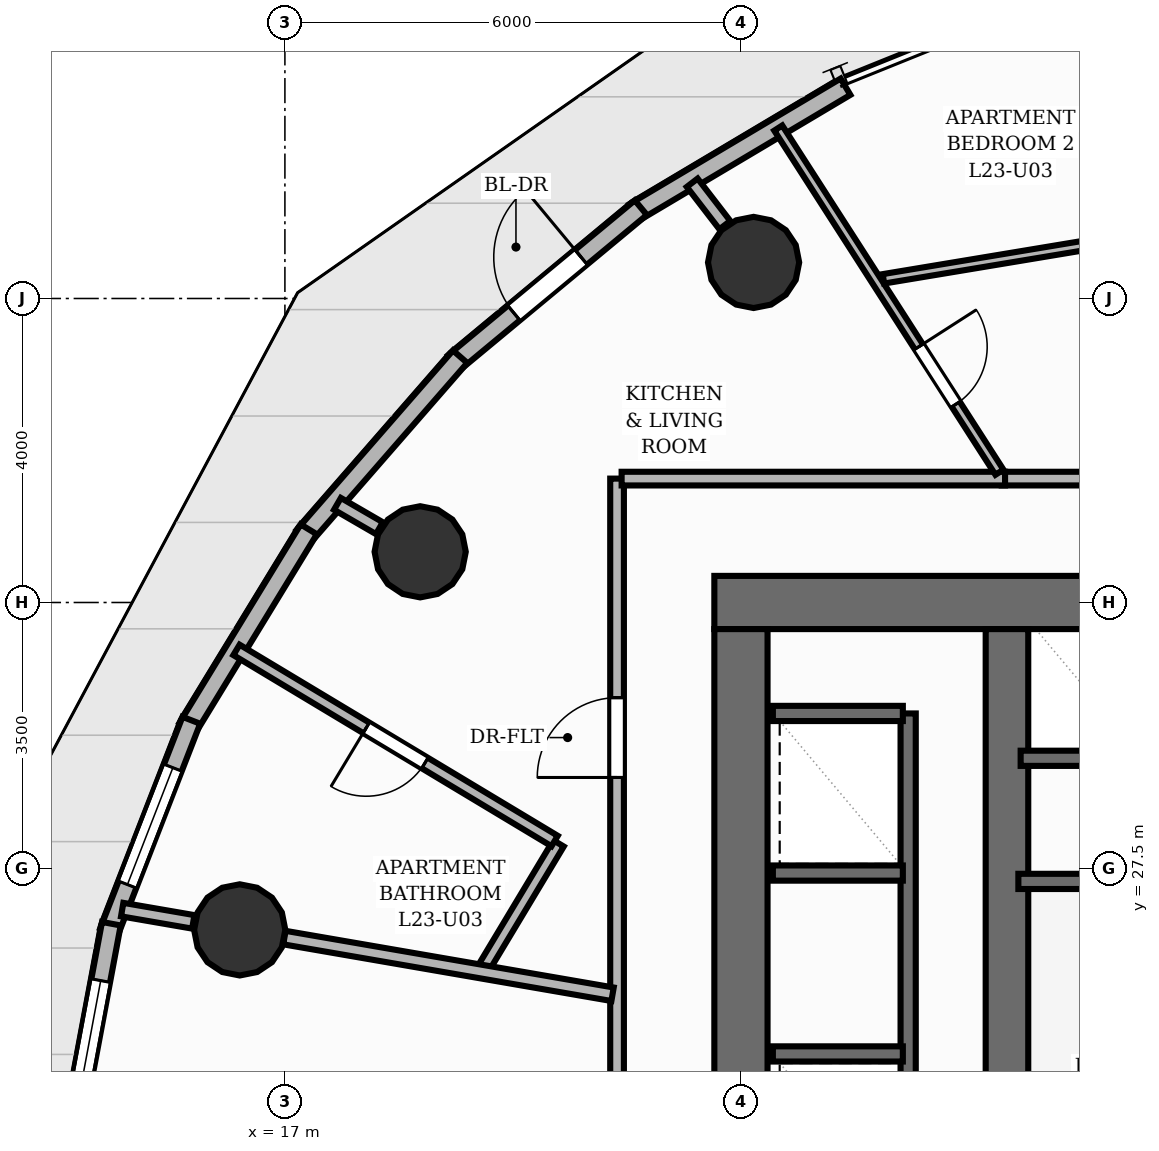
"""IFC4 building model, lengths in metres.
Left out: names, types, materials, properties, quantities, classifications, styles, units other than length and angle.
Written with IfcOpenShell. Run it as: python <this file> out.ifc"""

import sys

from ifc_helpers import new_model, si_unit, direction, frame, frame_2d, origin, origin_2d, place, context, subcontext, project, spatial, rectangle, circle, extrude, element, fill, save


model = new_model("IFC4")
c1 = context("Model", 3, precision=1e-05, world=origin(), true_north=direction((0.0, 1.0)))
c2 = subcontext(c1, "Body", "Model", "MODEL_VIEW")
j1 = project(units=[si_unit("LENGTHUNIT", "METRE"), si_unit("PLANEANGLEUNIT", "RADIAN")], contexts=[c1])
p1 = place(None, origin())
s1 = spatial("IfcSite", under=j1, at=p1, CompositionType="ELEMENT")
p2 = place(p1, origin())
s2 = spatial("IfcBuilding", under=s1, at=p2, CompositionType="ELEMENT")
p3 = place(p2, frame((0.0, 0.0, 80.48)))
s3 = spatial("IfcBuildingStorey", under=s2, at=p3, CompositionType="ELEMENT", Elevation=80.48)
p4 = place(p3, frame((22.65, 31.0, 0.0), z_axis=(0.0, 0.0, 1.0), x_axis=(1.0, 0.0, 0.0)))
e1 = element("IfcWall", 1, at=p4, inside=s3, PredefinedType="SHEAR", context=c2, shape_type="SweptSolid", body=[
    extrude(rectangle(XDim=18.7, YDim=0.7, at=frame_2d((9.35, 0.0))), origin(), (0.0, 0.0, 1.0), 3.2),
])
p5 = place(p4, frame((11.75, 0.0, 0.0)))
e2 = element("IfcOpeningElement", 2, at=p5, cuts=e1, PredefinedType="OPENING", context=c2, shape_type="SweptSolid", body=[
    extrude(rectangle(XDim=1.1, YDim=2.15, at=frame_2d((0.55, 1.075))), frame((0.0, 0.36, 0.0), z_axis=(0.0, -1.0, 0.0), x_axis=(1.0, 0.0, 0.0)), (0.0, 0.0, 1.0), 0.72),
])
p6 = place(p3, frame((23.0, 17.35, 0.0), z_axis=(0.0, 0.0, 1.0), x_axis=(0.0, 1.0, 0.0)))
e3 = element("IfcWall", 3, at=p6, inside=s3, PredefinedType="SHEAR", context=c2, shape_type="SweptSolid", body=[
    extrude(rectangle(XDim=13.3, YDim=0.7, at=frame_2d((6.65, 0.0))), origin(), (0.0, 0.0, 1.0), 3.2),
])
p7 = place(p3, frame((26.5, 17.35, 0.0), z_axis=(0.0, 0.0, 1.0), x_axis=(0.0, 1.0, 0.0)))
e4 = element("IfcWall", 4, at=p7, inside=s3, PredefinedType="SHEAR", context=c2, shape_type="SweptSolid", body=[
    extrude(rectangle(XDim=13.3, YDim=0.56, at=frame_2d((6.65, 0.0))), origin(), (0.0, 0.0, 1.0), 3.2),
])
for number, where, z_axis, x_axis in (
    (5, (23.167, 35.474, 0.0), (0.0, 0.0, 1.0), (1.0, 0.0, 0.0)),
    (6, (18.78, 31.667, 0.0), (0.0, 0.0, 1.0), (1.0, 0.0, 0.0)),
    (7, (16.406, 26.692, 0.0), (0.0, 0.0, 1.0), (1.0, 0.0, 0.0)),
):
    element("IfcColumn", number, at=place(p3, frame(where, z_axis=z_axis, x_axis=x_axis)), inside=s3, PredefinedType="COLUMN", context=c2, shape_type="SweptSolid", body=[
        extrude(circle(Radius=0.6, at=origin_2d()), origin(), (0.0, 0.0, 1.0), 3.2),
    ])
p8 = place(p3, frame((21.594, 36.132, 0.0), z_axis=(0.0, 0.0, 1.0), x_axis=(0.859543053771, 0.511063341196, 0.0)))
e8 = element("IfcWall", 8, at=p8, inside=s3, PredefinedType="SOLIDWALL", context=c2, shape_type="SweptSolid", body=[
    extrude(rectangle(XDim=3.236, YDim=0.25, at=frame_2d((1.618, 0.0))), origin(), (0.0, 0.0, 1.0), 2.96),
])
p9 = place(p3, frame((19.227, 34.157, 0.0), z_axis=(0.0, 0.0, 1.0), x_axis=(0.769611275013, 0.638512713557, 0.0)))
e9 = element("IfcWall", 9, at=p9, inside=s3, PredefinedType="SOLIDWALL", context=c2, shape_type="SweptSolid", body=[
    extrude(rectangle(XDim=3.192, YDim=0.25, at=frame_2d((1.596, 0.0))), origin(), (0.0, 0.0, 1.0), 2.96),
])
p10 = place(p9, frame((1.021, 0.0, 0.0)))
e10 = element("IfcOpeningElement", 10, at=p10, cuts=e9, PredefinedType="OPENING", context=c2, shape_type="SweptSolid", body=[
    extrude(rectangle(XDim=1.15, YDim=2.2, at=frame_2d((0.575, 1.1))), frame((0.0, 0.135, 0.0), z_axis=(0.0, -1.0, 0.0), x_axis=(1.0, 0.0, 0.0)), (0.0, 0.0, 1.0), 0.27),
])
p11 = place(p3, frame((17.248, 31.873, 0.0), z_axis=(0.0, 0.0, 1.0), x_axis=(0.656940925155, 0.753942054044, 0.0)))
e11 = element("IfcWall", 11, at=p11, inside=s3, PredefinedType="SOLIDWALL", context=c2, shape_type="SweptSolid", body=[
    extrude(rectangle(XDim=3.131, YDim=0.25, at=frame_2d((1.565, 0.0))), origin(), (0.0, 0.0, 1.0), 2.96),
])
p12 = place(p3, frame((15.719, 29.35, 0.0), z_axis=(0.0, 0.0, 1.0), x_axis=(0.520956264952, 0.853583370273, 0.0)))
e12 = element("IfcWall", 12, at=p12, inside=s3, PredefinedType="SOLIDWALL", context=c2, shape_type="SweptSolid", body=[
    extrude(rectangle(XDim=3.061, YDim=0.25, at=frame_2d((1.53, 0.0))), origin(), (0.0, 0.0, 1.0), 2.96),
])
p13 = place(p3, frame((14.686, 26.665, 0.0), z_axis=(0.0, 0.0, 1.0), x_axis=(0.362414720493, 0.93201693674, 0.0)))
e13 = element("IfcWall", 13, at=p13, inside=s3, PredefinedType="SOLIDWALL", context=c2, shape_type="SweptSolid", body=[
    extrude(rectangle(XDim=2.988, YDim=0.25, at=frame_2d((1.494, 0.0))), origin(), (0.0, 0.0, 1.0), 2.96),
])
p14 = place(p13, frame((0.669, 0.0, 0.85)))
e14 = element("IfcOpeningElement", 14, at=p14, cuts=e13, PredefinedType="OPENING", context=c2, shape_type="SweptSolid", body=[
    extrude(rectangle(XDim=1.65, YDim=1.37, at=frame_2d((0.825, 0.685))), frame((0.0, 0.135, 0.0), z_axis=(0.0, -1.0, 0.0), x_axis=(1.0, 0.0, 0.0)), (0.0, 0.0, 1.0), 0.27),
])
p15 = place(p3, frame((14.179, 23.9, 0.0), z_axis=(0.0, 0.0, 1.0), x_axis=(0.183975908968, 0.982930752861, 0.0)))
e15 = element("IfcWall", 15, at=p15, inside=s3, PredefinedType="SOLIDWALL", context=c2, shape_type="SweptSolid", body=[
    extrude(rectangle(XDim=2.923, YDim=0.25, at=frame_2d((1.462, 0.0))), origin(), (0.0, 0.0, 1.0), 2.96),
])
p16 = place(p15, frame((0.762, 0.0, 0.85)))
e16 = element("IfcOpeningElement", 16, at=p16, cuts=e15, PredefinedType="OPENING", context=c2, shape_type="SweptSolid", body=[
    extrude(rectangle(XDim=1.4, YDim=1.55, at=frame_2d((0.7, 0.775))), frame((0.0, 0.135, 0.0), z_axis=(0.0, -1.0, 0.0), x_axis=(1.0, 0.0, 0.0)), (0.0, 0.0, 1.0), 0.27),
])
p17 = place(p3, frame((26.65, 27.33, 0.0), z_axis=(0.0, 0.0, 1.0), x_axis=(1.0, 0.0, 0.0)))
e17 = element("IfcWall", 17, at=p17, inside=s3, PredefinedType="SHEAR", context=c2, shape_type="SweptSolid", body=[
    extrude(rectangle(XDim=3.24, YDim=0.2, at=frame_2d((1.62, 0.0))), origin(), (0.0, 0.0, 1.0), 3.2),
])
p18 = place(p3, frame((25.2, 18.46, 0.0), z_axis=(0.0, 0.0, 1.0), x_axis=(0.0, 1.0, 0.0)))
e18 = element("IfcWall", 18, at=p18, inside=s3, PredefinedType="SHEAR", context=c2, shape_type="SweptSolid", body=[
    extrude(rectangle(XDim=11.08, YDim=0.2, at=frame_2d((5.54, 0.0))), origin(), (0.0, 0.0, 1.0), 3.2),
])
for number, where, z_axis, x_axis in (
    (19, (23.42, 29.54, 0.0), (0.0, 0.0, 1.0), (1.0, 0.0, 0.0)),
    (20, (23.42, 25.06, 0.0), (0.0, 0.0, 1.0), (1.0, 0.0, 0.0)),
    (21, (23.42, 27.44, 0.0), (0.0, 0.0, 1.0), (1.0, 0.0, 0.0)),
):
    element("IfcWall", number, at=place(p3, frame(where, z_axis=z_axis, x_axis=x_axis)), inside=s3, PredefinedType="SHEAR", context=c2, shape_type="SweptSolid", body=[
        extrude(rectangle(XDim=1.71, YDim=0.2, at=frame_2d((0.855, 0.0))), origin(), (0.0, 0.0, 1.0), 3.2),
    ])
p19 = place(p3, frame((26.68, 28.95, 0.0), z_axis=(0.0, 0.0, 1.0), x_axis=(1.0, 0.0, 0.0)))
e22 = element("IfcWall", 22, at=p19, inside=s3, PredefinedType="SHEAR", context=c2, shape_type="SweptSolid", body=[
    extrude(rectangle(XDim=5.24, YDim=0.2, at=frame_2d((2.62, 0.0))), origin(), (0.0, 0.0, 1.0), 3.2),
])
p20 = place(p3, frame((22.788, 35.966, 0.0), z_axis=(0.0, 0.0, 1.0), x_axis=(-0.609945476355, 0.792443383387, 0.0)))
e23 = element("IfcWall", 23, at=p20, inside=s3, PredefinedType="PARTITIONING", context=c2, shape_type="SweptSolid", body=[
    extrude(rectangle(XDim=0.704, YDim=0.18, at=frame_2d((0.352, 0.0))), origin(), (0.0, 0.0, 1.0), 2.26),
])
p21 = place(p3, frame((18.243, 31.978, 0.0), z_axis=(0.0, 0.0, 1.0), x_axis=(-0.864928236137, 0.501895553212, 0.0)))
e24 = element("IfcWall", 24, at=p21, inside=s3, PredefinedType="PARTITIONING", context=c2, shape_type="SweptSolid", body=[
    extrude(rectangle(XDim=0.638, YDim=0.18, at=frame_2d((0.319, 0.0))), origin(), (0.0, 0.0, 1.0), 2.26),
])
p22 = place(p3, frame((15.794, 26.798, 0.0), z_axis=(0.0, 0.0, 1.0), x_axis=(-0.985396187556, 0.170277284302, 0.0)))
e25 = element("IfcWall", 25, at=p22, inside=s3, PredefinedType="PARTITIONING", context=c2, shape_type="SweptSolid", body=[
    extrude(rectangle(XDim=0.949, YDim=0.18, at=frame_2d((0.475, 0.0))), origin(), (0.0, 0.0, 1.0), 2.26),
])
p23 = place(p3, frame((26.431, 32.63, 0.0), z_axis=(0.0, 0.0, 1.0), x_axis=(1.0, 0.0, 0.0)))
e26 = element("IfcWall", 26, at=p23, inside=s3, PredefinedType="PARTITIONING", context=c2, shape_type="SweptSolid", body=[
    extrude(rectangle(XDim=16.199, YDim=0.18, at=frame_2d((8.099, 0.0))), origin(), (0.0, 0.0, 1.0), 2.955),
])
p24 = place(p23, frame((11.645, 0.0, 0.0)))
e27 = element("IfcOpeningElement", 27, at=p24, cuts=e26, PredefinedType="OPENING", context=c2, shape_type="SweptSolid", body=[
    extrude(rectangle(XDim=1.05, YDim=2.15, at=frame_2d((0.525, 1.075))), frame((0.0, 0.1, 0.0), z_axis=(0.0, -1.0, 0.0), x_axis=(1.0, 0.0, 0.0)), (0.0, 0.0, 1.0), 0.2),
])
p25 = place(p3, frame((21.37, 15.37, 0.0), z_axis=(0.0, 0.0, 1.0), x_axis=(0.0, 1.0, 0.0)))
e28 = element("IfcWall", 28, at=p25, inside=s3, PredefinedType="PARTITIONING", context=c2, shape_type="SweptSolid", body=[
    extrude(rectangle(XDim=17.26, YDim=0.18, at=frame_2d((8.63, 0.0))), origin(), (0.0, 0.0, 1.0), 2.955),
])
p26 = place(p25, frame((13.328, 0.0, 0.0)))
e29 = element("IfcOpeningElement", 29, at=p26, cuts=e28, PredefinedType="OPENING", context=c2, shape_type="SweptSolid", body=[
    extrude(rectangle(XDim=1.05, YDim=2.15, at=frame_2d((0.525, 1.075))), frame((0.0, 0.1, 0.0), z_axis=(0.0, -1.0, 0.0), x_axis=(1.0, 0.0, 0.0)), (0.0, 0.0, 1.0), 0.2),
])
p27 = place(p25, frame((4.718, 0.0, 0.0)))
e30 = element("IfcOpeningElement", 30, at=p27, cuts=e28, PredefinedType="OPENING", context=c2, shape_type="SweptSolid", body=[
    extrude(rectangle(XDim=1.05, YDim=2.15, at=frame_2d((0.525, 1.075))), frame((0.0, 0.1, 0.0), z_axis=(0.0, -1.0, 0.0), x_axis=(1.0, 0.0, 0.0)), (0.0, 0.0, 1.0), 0.2),
])
p28 = place(p3, frame((21.43, 32.63, 0.0), z_axis=(0.0, 0.0, 1.0), x_axis=(1.0, 0.0, 0.0)))
e31 = element("IfcWall", 31, at=p28, inside=s3, PredefinedType="PARTITIONING", context=c2, shape_type="SweptSolid", body=[
    extrude(rectangle(XDim=5.045, YDim=0.18, at=frame_2d((2.522, 0.0))), origin(), (0.0, 0.0, 1.0), 2.955),
])
p29 = place(p3, frame((19.586, 26.143, 0.0), z_axis=(0.0, 0.0, 1.0), x_axis=(0.514969792399, 0.857208325272, 0.0)))
e32 = element("IfcWall", 32, at=p29, inside=s3, PredefinedType="PLUMBINGWALL", context=c2, shape_type="SweptSolid", body=[
    extrude(rectangle(XDim=1.969, YDim=0.16, at=frame_2d((0.984, 0.0))), origin(), (0.0, 0.0, 1.0), 2.955),
])
p30 = place(p3, frame((20.549, 27.862, 0.0), z_axis=(0.0, 0.0, 1.0), x_axis=(-0.857214854591, 0.514958923672, 0.0)))
e33 = element("IfcWall", 33, at=p30, inside=s3, PredefinedType="PLUMBINGWALL", context=c2, shape_type="SweptSolid", body=[
    extrude(rectangle(XDim=4.883, YDim=0.16, at=frame_2d((2.441, 0.0))), origin(), (0.0, 0.0, 1.0), 2.955),
])
p31 = place(p30, frame((1.991, 0.0, 0.0)))
e34 = element("IfcOpeningElement", 34, at=p31, cuts=e33, PredefinedType="OPENING", context=c2, shape_type="SweptSolid", body=[
    extrude(rectangle(XDim=0.9, YDim=2.1, at=frame_2d((0.45, 1.05))), frame((0.0, 0.09, 0.0), z_axis=(0.0, -1.0, 0.0), x_axis=(1.0, 0.0, 0.0)), (0.0, 0.0, 1.0), 0.18),
])
p32 = place(p3, frame((23.491, 37.243, 0.0), z_axis=(0.0, 0.0, 1.0), x_axis=(0.540565030624, -0.841302233247, 0.0)))
e35 = element("IfcWall", 35, at=p32, inside=s3, PredefinedType="PARTITIONING", context=c2, shape_type="SweptSolid", body=[
    extrude(rectangle(XDim=5.383, YDim=0.125, at=frame_2d((2.691, 0.0))), origin(), (0.0, 0.0, 1.0), 2.955),
])
p33 = place(p32, frame((3.42, 0.0, 0.0)))
e36 = element("IfcOpeningElement", 36, at=p33, cuts=e35, PredefinedType="OPENING", context=c2, shape_type="SweptSolid", body=[
    extrude(rectangle(XDim=0.9, YDim=2.1, at=frame_2d((0.45, 1.05))), frame((0.0, 0.073, 0.0), z_axis=(0.0, -1.0, 0.0), x_axis=(1.0, 0.0, 0.0)), (0.0, 0.0, 1.0), 0.145),
])
p34 = place(p3, frame((21.311, 25.845, 0.0), z_axis=(0.0, 0.0, 1.0), x_axis=(-0.98541310568, 0.170179349963, 0.0)))
e37 = element("IfcWall", 37, at=p34, inside=s3, PredefinedType="PARTITIONING", context=c2, shape_type="SweptSolid", body=[
    extrude(rectangle(XDim=4.381, YDim=0.18, at=frame_2d((2.191, 0.0))), origin(), (0.0, 0.0, 1.0), 2.26),
])
p35 = place(p3, frame((24.875, 35.259, 0.0), z_axis=(0.0, 0.0, 1.0), x_axis=(0.986466792703, 0.163961174958, 0.0)))
e38 = element("IfcWall", 38, at=p35, inside=s3, PredefinedType="PARTITIONING", context=c2, shape_type="SweptSolid", body=[
    extrude(rectangle(XDim=10.128, YDim=0.125, at=frame_2d((5.064, 0.0))), origin(), (0.0, 0.0, 1.0), 2.955),
])
p36 = place(p35, frame((5.034, 0.0, 0.0)))
e39 = element("IfcOpeningElement", 39, at=p36, cuts=e38, PredefinedType="OPENING", context=c2, shape_type="SweptSolid", body=[
    extrude(rectangle(XDim=0.9, YDim=2.1, at=frame_2d((0.45, 1.05))), frame((0.0, 0.073, 0.0), z_axis=(0.0, -1.0, 0.0), x_axis=(1.0, 0.0, 0.0)), (0.0, 0.0, 1.0), 0.145),
])
p37 = place(p10, origin())
e40 = element("IfcDoor", 40, at=p37, inside=s3, OperationType="SINGLE_SWING_RIGHT", PredefinedType="DOOR", context=c2, shape_type="SweptSolid", body=[
    extrude(rectangle(XDim=1.15, YDim=2.2, at=frame_2d((0.575, 1.1))), frame((0.0, 0.025, 0.0), z_axis=(0.0, -1.0, 0.0), x_axis=(1.0, 0.0, 0.0)), (0.0, 0.0, 1.0), 0.05),
])
fill(e10, e40)
p38 = place(p14, origin())
e41 = element("IfcWindow", 41, at=p38, inside=s3, PartitioningType="SINGLE_PANEL", PredefinedType="WINDOW", context=c2, shape_type="SweptSolid", body=[
    extrude(rectangle(XDim=1.65, YDim=1.37, at=frame_2d((0.825, 0.685))), frame((0.0, 0.03, 0.0), z_axis=(0.0, -1.0, 0.0), x_axis=(1.0, 0.0, 0.0)), (0.0, 0.0, 1.0), 0.06),
])
fill(e14, e41)
p39 = place(p16, origin())
e42 = element("IfcWindow", 42, at=p39, inside=s3, PartitioningType="SINGLE_PANEL", PredefinedType="WINDOW", context=c2, shape_type="SweptSolid", body=[
    extrude(rectangle(XDim=1.4, YDim=1.55, at=frame_2d((0.7, 0.775))), frame((0.0, 0.03, 0.0), z_axis=(0.0, -1.0, 0.0), x_axis=(1.0, 0.0, 0.0)), (0.0, 0.0, 1.0), 0.06),
])
fill(e16, e42)
p40 = place(p26, origin())
e43 = element("IfcDoor", 43, at=p40, inside=s3, OperationType="SINGLE_SWING_LEFT", PredefinedType="DOOR", context=c2, shape_type="SweptSolid", body=[
    extrude(rectangle(XDim=1.05, YDim=2.15, at=frame_2d((0.525, 1.075))), frame((0.0, 0.025, 0.0), z_axis=(0.0, -1.0, 0.0), x_axis=(1.0, 0.0, 0.0)), (0.0, 0.0, 1.0), 0.05),
])
fill(e29, e43)
p41 = place(p31, origin())
e44 = element("IfcDoor", 44, at=p41, inside=s3, OperationType="SINGLE_SWING_RIGHT", PredefinedType="DOOR", context=c2, shape_type="SweptSolid", body=[
    extrude(rectangle(XDim=0.9, YDim=2.1, at=frame_2d((0.45, 1.05))), frame((0.0, 0.025, 0.0), z_axis=(0.0, -1.0, 0.0), x_axis=(1.0, 0.0, 0.0)), (0.0, 0.0, 1.0), 0.05),
])
fill(e34, e44)
p42 = place(p33, origin())
e45 = element("IfcDoor", 45, at=p42, inside=s3, OperationType="SINGLE_SWING_LEFT", PredefinedType="DOOR", context=c2, shape_type="SweptSolid", body=[
    extrude(rectangle(XDim=0.9, YDim=2.1, at=frame_2d((0.45, 1.05))), frame((0.0, 0.025, 0.0), z_axis=(0.0, -1.0, 0.0), x_axis=(1.0, 0.0, 0.0)), (0.0, 0.0, 1.0), 0.05),
])
fill(e36, e45)
save(model, sys.argv[1])
